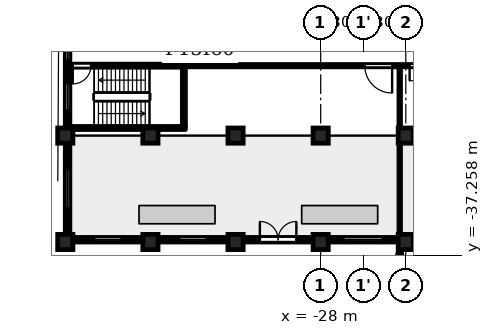
"""IFC4 building model, lengths in metres.
Left out: names, types, materials, properties, quantities, classifications, styles, units other than length and angle.
Written with IfcOpenShell. Run it as: python <this file> out.ifc"""

import sys

from ifc_helpers import new_model, si_unit, direction, frame, frame_2d, origin, origin_2d, place, context, subcontext, project, spatial, rectangle, circle, extrude, element, fill, save


model = new_model("IFC4")
c1 = context("Model", 3, precision=1e-05, world=origin(), true_north=direction((0.0, 1.0)))
c2 = subcontext(c1, "Body", "Model", "MODEL_VIEW")
j1 = project(units=[si_unit("LENGTHUNIT", "METRE"), si_unit("PLANEANGLEUNIT", "RADIAN")], contexts=[c1])
p1 = place(None, origin())
s1 = spatial("IfcSite", under=j1, at=p1, CompositionType="ELEMENT")
p2 = place(p1, origin())
s2 = spatial("IfcBuilding", under=s1, at=p2, CompositionType="ELEMENT")
p3 = place(p2, frame((0.0, 0.0, 20.9)))
s3 = spatial("IfcBuildingStorey", under=s2, at=p3, CompositionType="ELEMENT", Elevation=20.9)
for number, where, z_axis, x_axis in (
    (1, (-44.8, -29.4, 0.0), (0.0, 0.0, 1.0), (1.0, 0.0, 0.0)),
    (2, (-39.2, -29.4, 0.0), (0.0, 0.0, 1.0), (1.0, 0.0, 0.0)),
    (3, (-33.6, -29.4, 0.0), (0.0, 0.0, 1.0), (1.0, 0.0, 0.0)),
    (4, (-28.0, -29.4, 0.0), (0.0, 0.0, 1.0), (1.0, 0.0, 0.0)),
    (5, (-22.4, -29.4, 0.0), (0.0, 0.0, 1.0), (1.0, 0.0, 0.0)),
    (6, (-44.8, -36.4, 0.0), (0.0, 0.0, 1.0), (1.0, 0.0, 0.0)),
    (7, (-39.2, -36.4, 0.0), (0.0, 0.0, 1.0), (1.0, 0.0, 0.0)),
    (8, (-33.6, -36.4, 0.0), (0.0, 0.0, 1.0), (1.0, 0.0, 0.0)),
    (9, (-28.0, -36.4, 0.0), (0.0, 0.0, 1.0), (1.0, 0.0, 0.0)),
    (10, (-22.4, -36.4, 0.0), (0.0, 0.0, 1.0), (1.0, 0.0, 0.0)),
):
    element("IfcColumn", number, at=place(p3, frame(where, z_axis=z_axis, x_axis=x_axis)), inside=s3, PredefinedType="COLUMN", context=c2, shape_type="SweptSolid", body=[
        extrude(circle(Radius=0.5, at=origin_2d()), origin(), (0.0, 0.0, 1.0), 4.8),
    ])
p4 = place(p3, frame((-44.65, -22.9, 0.0), z_axis=(0.0, 0.0, 1.0), x_axis=(0.0, -1.0, 0.0)))
e11 = element("IfcWall", 11, at=p4, inside=s3, PredefinedType="SOLIDWALL", context=c2, shape_type="SweptSolid", body=[
    extrude(rectangle(XDim=6.0, YDim=0.3, at=frame_2d((3.0, 0.0))), origin(), (0.0, 0.0, 1.0), 3.65),
])
p5 = place(p4, frame((0.312, 0.0, 0.6)))
e12 = element("IfcOpeningElement", 12, at=p5, cuts=e11, PredefinedType="OPENING", context=c2, shape_type="SweptSolid", body=[
    extrude(rectangle(XDim=1.2, YDim=1.55, at=frame_2d((0.6, 0.775))), frame((0.0, 0.16, 0.0), z_axis=(0.0, -1.0, 0.0), x_axis=(1.0, 0.0, 0.0)), (0.0, 0.0, 1.0), 0.32),
])
p6 = place(p4, frame((3.05, 0.0, 0.9)))
e13 = element("IfcOpeningElement", 13, at=p6, cuts=e11, PredefinedType="OPENING", context=c2, shape_type="SweptSolid", body=[
    extrude(rectangle(XDim=1.8, YDim=1.25, at=frame_2d((0.9, 0.625))), frame((0.0, 0.16, 0.0), z_axis=(0.0, -1.0, 0.0), x_axis=(1.0, 0.0, 0.0)), (0.0, 0.0, 1.0), 0.32),
])
p7 = place(p3, frame((-44.65, -29.9, 0.0), z_axis=(0.0, 0.0, 1.0), x_axis=(0.0, -1.0, 0.0)))
e14 = element("IfcWall", 14, at=p7, inside=s3, PredefinedType="SOLIDWALL", context=c2, shape_type="SweptSolid", body=[
    extrude(rectangle(XDim=6.0, YDim=0.3, at=frame_2d((3.0, 0.0))), origin(), (0.0, 0.0, 1.0), 3.65),
])
p8 = place(p7, frame((1.7, 0.0, 0.9)))
e15 = element("IfcOpeningElement", 15, at=p8, cuts=e14, PredefinedType="OPENING", context=c2, shape_type="SweptSolid", body=[
    extrude(rectangle(XDim=2.6, YDim=1.25, at=frame_2d((1.3, 0.625))), frame((0.0, 0.16, 0.0), z_axis=(0.0, -1.0, 0.0), x_axis=(1.0, 0.0, 0.0)), (0.0, 0.0, 1.0), 0.32),
])
p9 = place(p3, frame((-44.3, -36.25, 0.0), z_axis=(0.0, 0.0, 1.0), x_axis=(1.0, 0.0, 0.0)))
e16 = element("IfcWall", 16, at=p9, inside=s3, PredefinedType="SOLIDWALL", context=c2, shape_type="SweptSolid", body=[
    extrude(rectangle(XDim=4.6, YDim=0.3, at=frame_2d((2.3, 0.0))), origin(), (0.0, 0.0, 1.0), 3.65),
])
p10 = place(p9, frame((1.4, 0.0, 0.9)))
e17 = element("IfcOpeningElement", 17, at=p10, cuts=e16, PredefinedType="OPENING", context=c2, shape_type="SweptSolid", body=[
    extrude(rectangle(XDim=1.8, YDim=1.25, at=frame_2d((0.9, 0.625))), frame((0.0, 0.16, 0.0), z_axis=(0.0, -1.0, 0.0), x_axis=(1.0, 0.0, 0.0)), (0.0, 0.0, 1.0), 0.32),
])
p11 = place(p3, frame((-38.7, -36.25, 0.0), z_axis=(0.0, 0.0, 1.0), x_axis=(1.0, 0.0, 0.0)))
e18 = element("IfcWall", 18, at=p11, inside=s3, PredefinedType="SOLIDWALL", context=c2, shape_type="SweptSolid", body=[
    extrude(rectangle(XDim=4.6, YDim=0.3, at=frame_2d((2.3, 0.0))), origin(), (0.0, 0.0, 1.0), 3.65),
])
p12 = place(p11, frame((1.4, 0.0, 0.9)))
e19 = element("IfcOpeningElement", 19, at=p12, cuts=e18, PredefinedType="OPENING", context=c2, shape_type="SweptSolid", body=[
    extrude(rectangle(XDim=1.8, YDim=1.25, at=frame_2d((0.9, 0.625))), frame((0.0, 0.16, 0.0), z_axis=(0.0, -1.0, 0.0), x_axis=(1.0, 0.0, 0.0)), (0.0, 0.0, 1.0), 0.32),
])
p13 = place(p3, frame((-33.1, -36.25, 0.0), z_axis=(0.0, 0.0, 1.0), x_axis=(1.0, 0.0, 0.0)))
e20 = element("IfcWall", 20, at=p13, inside=s3, PredefinedType="SOLIDWALL", context=c2, shape_type="SweptSolid", body=[
    extrude(rectangle(XDim=4.6, YDim=0.3, at=frame_2d((2.3, 0.0))), origin(), (0.0, 0.0, 1.0), 3.65),
])
p14 = place(p13, frame((1.1, 0.0, 0.0)))
e21 = element("IfcOpeningElement", 21, at=p14, cuts=e20, PredefinedType="OPENING", context=c2, shape_type="SweptSolid", body=[
    extrude(rectangle(XDim=2.4, YDim=2.3, at=frame_2d((1.2, 1.15))), frame((0.0, 0.16, 0.0), z_axis=(0.0, -1.0, 0.0), x_axis=(1.0, 0.0, 0.0)), (0.0, 0.0, 1.0), 0.32),
])
p15 = place(p3, frame((-27.5, -36.25, 0.0), z_axis=(0.0, 0.0, 1.0), x_axis=(1.0, 0.0, 0.0)))
e22 = element("IfcWall", 22, at=p15, inside=s3, PredefinedType="SOLIDWALL", context=c2, shape_type="SweptSolid", body=[
    extrude(rectangle(XDim=4.6, YDim=0.3, at=frame_2d((2.3, 0.0))), origin(), (0.0, 0.0, 1.0), 3.65),
])
p16 = place(p15, frame((1.0, 0.0, 0.9)))
e23 = element("IfcOpeningElement", 23, at=p16, cuts=e22, PredefinedType="OPENING", context=c2, shape_type="SweptSolid", body=[
    extrude(rectangle(XDim=2.6, YDim=1.25, at=frame_2d((1.3, 0.625))), frame((0.0, 0.16, 0.0), z_axis=(0.0, -1.0, 0.0), x_axis=(1.0, 0.0, 0.0)), (0.0, 0.0, 1.0), 0.32),
])
p17 = place(p3, frame((-21.9, -36.25, 0.0), z_axis=(0.0, 0.0, 1.0), x_axis=(1.0, 0.0, 0.0)))
e24 = element("IfcWall", 24, at=p17, inside=s3, PredefinedType="SOLIDWALL", context=c2, shape_type="SweptSolid", body=[
    extrude(rectangle(XDim=4.6, YDim=0.3, at=frame_2d((2.3, 0.0))), origin(), (0.0, 0.0, 1.0), 3.65),
])
p18 = place(p17, frame((0.5, 0.0, 1.2)))
e25 = element("IfcOpeningElement", 25, at=p18, cuts=e24, PredefinedType="OPENING", context=c2, shape_type="SweptSolid", body=[
    extrude(rectangle(XDim=3.6, YDim=0.95, at=frame_2d((1.8, 0.475))), frame((0.0, 0.16, 0.0), z_axis=(0.0, -1.0, 0.0), x_axis=(1.0, 0.0, 0.0)), (0.0, 0.0, 1.0), 0.32),
])
p19 = place(p3, frame((-44.71, -28.9, 0.0), z_axis=(0.0, 0.0, 1.0), x_axis=(1.0, 0.0, 0.0)))
e26 = element("IfcWall", 26, at=p19, inside=s3, PredefinedType="SHEAR", context=c2, shape_type="SweptSolid", body=[
    extrude(rectangle(XDim=7.81, YDim=0.2, at=frame_2d((3.905, 0.0))), origin(), (0.0, 0.0, 1.0), 4.45),
])
p20 = place(p3, frame((-37.0, -24.8, 0.0), z_axis=(0.0, 0.0, 1.0), x_axis=(1.0, 0.0, 0.0)))
e27 = element("IfcWall", 27, at=p20, inside=s3, PredefinedType="PARTITIONING", context=c2, shape_type="SweptSolid", body=[
    extrude(rectangle(XDim=74.0, YDim=0.15, at=frame_2d((37.0, 0.0))), origin(), (0.0, 0.0, 1.0), 4.45),
])
p21 = place(p20, frame((11.9, 0.0, 0.0)))
e28 = element("IfcOpeningElement", 28, at=p21, cuts=e27, PredefinedType="OPENING", context=c2, shape_type="SweptSolid", body=[
    extrude(rectangle(XDim=1.8, YDim=2.1, at=frame_2d((0.9, 1.05))), frame((0.0, 0.085, 0.0), z_axis=(0.0, -1.0, 0.0), x_axis=(1.0, 0.0, 0.0)), (0.0, 0.0, 1.0), 0.17),
])
p22 = place(p20, frame((14.85, 0.0, 0.0)))
e29 = element("IfcOpeningElement", 29, at=p22, cuts=e27, PredefinedType="OPENING", context=c2, shape_type="SweptSolid", body=[
    extrude(rectangle(XDim=1.0, YDim=2.1, at=frame_2d((0.5, 1.05))), frame((0.0, 0.085, 0.0), z_axis=(0.0, -1.0, 0.0), x_axis=(1.0, 0.0, 0.0)), (0.0, 0.0, 1.0), 0.17),
])
p23 = place(p20, frame((35.6, 0.0, 0.0)))
e30 = element("IfcOpeningElement", 30, at=p23, cuts=e27, PredefinedType="OPENING", context=c2, shape_type="SweptSolid", body=[
    extrude(rectangle(XDim=0.9, YDim=2.1, at=frame_2d((0.45, 1.05))), frame((0.0, 0.085, 0.0), z_axis=(0.0, -1.0, 0.0), x_axis=(1.0, 0.0, 0.0)), (0.0, 0.0, 1.0), 0.17),
])
p24 = place(p20, frame((37.65, 0.0, 0.0)))
e31 = element("IfcOpeningElement", 31, at=p24, cuts=e27, PredefinedType="OPENING", context=c2, shape_type="SweptSolid", body=[
    extrude(rectangle(XDim=1.0, YDim=2.1, at=frame_2d((0.5, 1.05))), frame((0.0, 0.085, 0.0), z_axis=(0.0, -1.0, 0.0), x_axis=(1.0, 0.0, 0.0)), (0.0, 0.0, 1.0), 0.17),
])
p25 = place(p20, frame((59.4, 0.0, 0.0)))
e32 = element("IfcOpeningElement", 32, at=p25, cuts=e27, PredefinedType="OPENING", context=c2, shape_type="SweptSolid", body=[
    extrude(rectangle(XDim=1.0, YDim=2.1, at=frame_2d((0.5, 1.05))), frame((0.0, 0.085, 0.0), z_axis=(0.0, -1.0, 0.0), x_axis=(1.0, 0.0, 0.0)), (0.0, 0.0, 1.0), 0.17),
])
p26 = place(p20, frame((61.65, 0.0, 0.0)))
e33 = element("IfcOpeningElement", 33, at=p26, cuts=e27, PredefinedType="OPENING", context=c2, shape_type="SweptSolid", body=[
    extrude(rectangle(XDim=1.0, YDim=2.1, at=frame_2d((0.5, 1.05))), frame((0.0, 0.085, 0.0), z_axis=(0.0, -1.0, 0.0), x_axis=(1.0, 0.0, 0.0)), (0.0, 0.0, 1.0), 0.17),
])
p27 = place(p3, frame((-44.71, -24.8, 0.0), z_axis=(0.0, 0.0, 1.0), x_axis=(1.0, 0.0, 0.0)))
e34 = element("IfcWall", 34, at=p27, inside=s3, PredefinedType="SHEAR", context=c2, shape_type="SweptSolid", body=[
    extrude(rectangle(XDim=7.71, YDim=0.2, at=frame_2d((3.855, 0.0))), origin(), (0.0, 0.0, 1.0), 4.45),
])
p28 = place(p27, frame((0.4, 0.0, 0.0)))
e35 = element("IfcOpeningElement", 35, at=p28, cuts=e34, PredefinedType="OPENING", context=c2, shape_type="SweptSolid", body=[
    extrude(rectangle(XDim=1.2, YDim=2.1, at=frame_2d((0.6, 1.05))), frame((0.0, 0.11, 0.0), z_axis=(0.0, -1.0, 0.0), x_axis=(1.0, 0.0, 0.0)), (0.0, 0.0, 1.0), 0.22),
])
p29 = place(p3, frame((-37.0, -28.8, 0.0), z_axis=(0.0, 0.0, 1.0), x_axis=(0.0, 1.0, 0.0)))
e36 = element("IfcWall", 36, at=p29, inside=s3, PredefinedType="SHEAR", context=c2, shape_type="SweptSolid", body=[
    extrude(rectangle(XDim=3.925, YDim=0.2, at=frame_2d((1.962, 0.0))), origin(), (0.0, 0.0, 1.0), 4.45),
])
p30 = place(p3, frame((-22.8, -37.23, 0.0), z_axis=(0.0, 0.0, 1.0), x_axis=(0.0, 1.0, 0.0)))
e37 = element("IfcWall", 37, at=p30, inside=s3, PredefinedType="PARTITIONING", context=c2, shape_type="SweptSolid", body=[
    extrude(rectangle(XDim=12.355, YDim=0.1, at=frame_2d((6.177, 0.0))), origin(), (0.0, 0.0, 1.0), 4.45),
])
p31 = place(p14, origin())
e38 = element("IfcDoor", 38, at=p31, inside=s3, OperationType="SINGLE_SWING_LEFT", PredefinedType="DOOR", context=c2, shape_type="SweptSolid", body=[
    extrude(rectangle(XDim=2.4, YDim=2.3, at=frame_2d((1.2, 1.15))), frame((0.0, 0.025, 0.0), z_axis=(0.0, -1.0, 0.0), x_axis=(1.0, 0.0, 0.0)), (0.0, 0.0, 1.0), 0.05),
])
fill(e21, e38)
p32 = place(p28, origin())
e39 = element("IfcDoor", 39, at=p32, inside=s3, OperationType="SINGLE_SWING_LEFT", PredefinedType="DOOR", context=c2, shape_type="SweptSolid", body=[
    extrude(rectangle(XDim=1.2, YDim=2.1, at=frame_2d((0.6, 1.05))), frame((0.0, 0.025, 0.0), z_axis=(0.0, -1.0, 0.0), x_axis=(1.0, 0.0, 0.0)), (0.0, 0.0, 1.0), 0.05),
])
fill(e35, e39)
p33 = place(p21, origin())
e40 = element("IfcDoor", 40, at=p33, inside=s3, OperationType="SINGLE_SWING_RIGHT", PredefinedType="DOOR", context=c2, shape_type="SweptSolid", body=[
    extrude(rectangle(XDim=1.8, YDim=2.1, at=frame_2d((0.9, 1.05))), frame((0.0, 0.025, 0.0), z_axis=(0.0, -1.0, 0.0), x_axis=(1.0, 0.0, 0.0)), (0.0, 0.0, 1.0), 0.05),
])
fill(e28, e40)
p34 = place(p22, origin())
e41 = element("IfcDoor", 41, at=p34, inside=s3, OperationType="SINGLE_SWING_LEFT", PredefinedType="DOOR", context=c2, shape_type="SweptSolid", body=[
    extrude(rectangle(XDim=1.0, YDim=2.1, at=frame_2d((0.5, 1.05))), frame((0.0, 0.025, 0.0), z_axis=(0.0, -1.0, 0.0), x_axis=(1.0, 0.0, 0.0)), (0.0, 0.0, 1.0), 0.05),
])
fill(e29, e41)
p35 = place(p5, origin())
e42 = element("IfcWindow", 42, at=p35, inside=s3, PartitioningType="SINGLE_PANEL", PredefinedType="WINDOW", context=c2, shape_type="SweptSolid", body=[
    extrude(rectangle(XDim=1.2, YDim=1.55, at=frame_2d((0.6, 0.775))), frame((0.0, 0.03, 0.0), z_axis=(0.0, -1.0, 0.0), x_axis=(1.0, 0.0, 0.0)), (0.0, 0.0, 1.0), 0.06),
])
fill(e12, e42)
p36 = place(p6, origin())
e43 = element("IfcWindow", 43, at=p36, inside=s3, PartitioningType="SINGLE_PANEL", PredefinedType="WINDOW", context=c2, shape_type="SweptSolid", body=[
    extrude(rectangle(XDim=1.8, YDim=1.25, at=frame_2d((0.9, 0.625))), frame((0.0, 0.03, 0.0), z_axis=(0.0, -1.0, 0.0), x_axis=(1.0, 0.0, 0.0)), (0.0, 0.0, 1.0), 0.06),
])
fill(e13, e43)
p37 = place(p8, origin())
e44 = element("IfcWindow", 44, at=p37, inside=s3, PartitioningType="SINGLE_PANEL", PredefinedType="WINDOW", context=c2, shape_type="SweptSolid", body=[
    extrude(rectangle(XDim=2.6, YDim=1.25, at=frame_2d((1.3, 0.625))), frame((0.0, 0.03, 0.0), z_axis=(0.0, -1.0, 0.0), x_axis=(1.0, 0.0, 0.0)), (0.0, 0.0, 1.0), 0.06),
])
fill(e15, e44)
p38 = place(p10, origin())
e45 = element("IfcWindow", 45, at=p38, inside=s3, PartitioningType="SINGLE_PANEL", PredefinedType="WINDOW", context=c2, shape_type="SweptSolid", body=[
    extrude(rectangle(XDim=1.8, YDim=1.25, at=frame_2d((0.9, 0.625))), frame((0.0, 0.03, 0.0), z_axis=(0.0, -1.0, 0.0), x_axis=(1.0, 0.0, 0.0)), (0.0, 0.0, 1.0), 0.06),
])
fill(e17, e45)
p39 = place(p12, origin())
e46 = element("IfcWindow", 46, at=p39, inside=s3, PartitioningType="SINGLE_PANEL", PredefinedType="WINDOW", context=c2, shape_type="SweptSolid", body=[
    extrude(rectangle(XDim=1.8, YDim=1.25, at=frame_2d((0.9, 0.625))), frame((0.0, 0.03, 0.0), z_axis=(0.0, -1.0, 0.0), x_axis=(1.0, 0.0, 0.0)), (0.0, 0.0, 1.0), 0.06),
])
fill(e19, e46)
p40 = place(p16, origin())
e47 = element("IfcWindow", 47, at=p40, inside=s3, PartitioningType="SINGLE_PANEL", PredefinedType="WINDOW", context=c2, shape_type="SweptSolid", body=[
    extrude(rectangle(XDim=2.6, YDim=1.25, at=frame_2d((1.3, 0.625))), frame((0.0, 0.03, 0.0), z_axis=(0.0, -1.0, 0.0), x_axis=(1.0, 0.0, 0.0)), (0.0, 0.0, 1.0), 0.06),
])
fill(e23, e47)
save(model, sys.argv[1])
